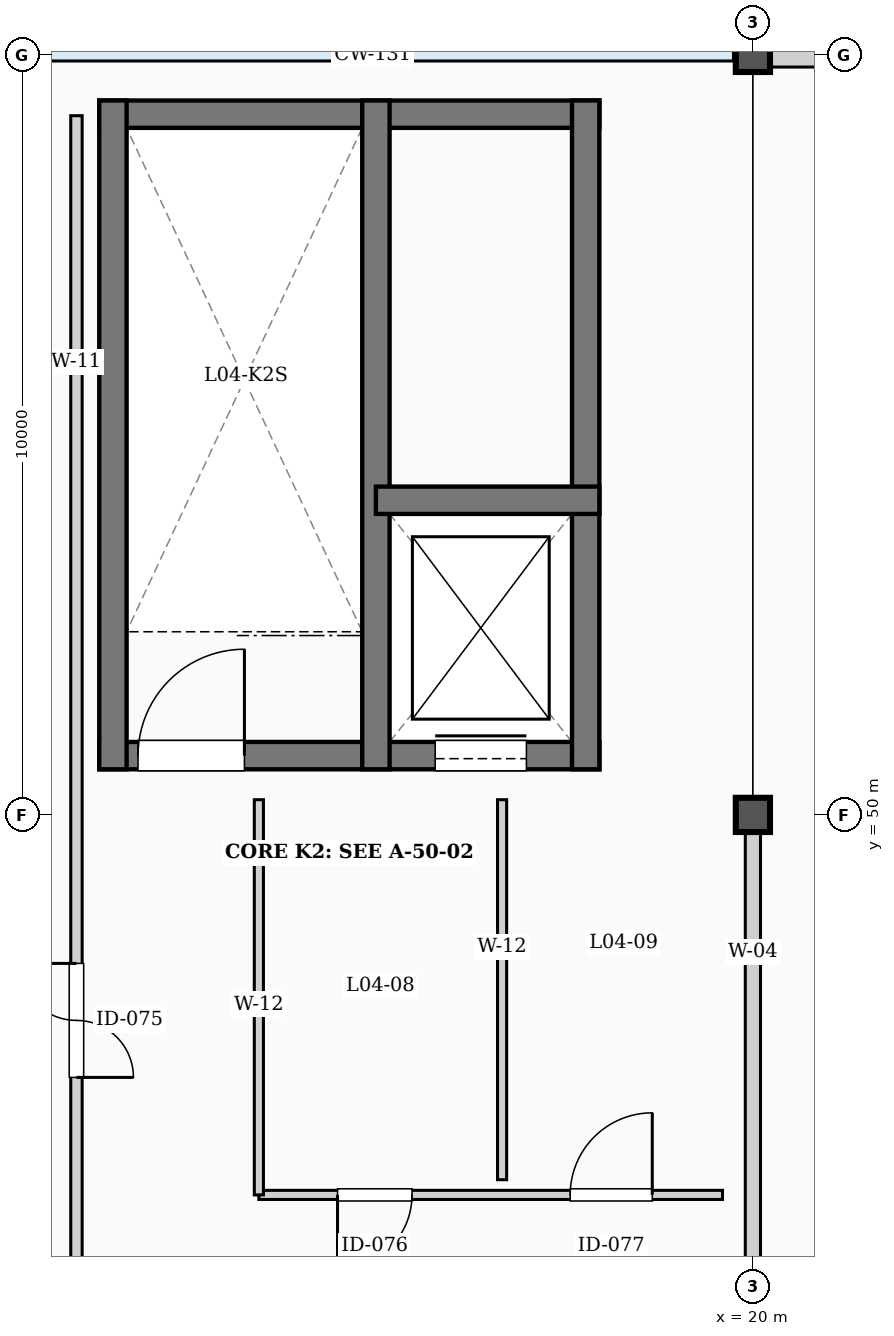
"""IFC4 building model, lengths in metres.
Left out: names, types, materials, properties, quantities, classifications, styles, units other than length and angle.
Written with IfcOpenShell. Run it as: python <this file> out.ifc"""

import sys

from ifc_helpers import new_model, si_unit, direction, frame, frame_2d, origin, origin_2d, place, context, subcontext, project, spatial, rectangle, extrude, element, fill, save


model = new_model("IFC4")
c1 = context("Model", 3, precision=1e-05, world=origin(), true_north=direction((0.0, 1.0)))
c2 = subcontext(c1, "Body", "Model", "MODEL_VIEW")
j1 = project(units=[si_unit("LENGTHUNIT", "METRE"), si_unit("PLANEANGLEUNIT", "RADIAN")], contexts=[c1])
p1 = place(None, origin())
s1 = spatial("IfcSite", under=j1, at=p1, CompositionType="ELEMENT")
p2 = place(p1, origin())
s2 = spatial("IfcBuilding", under=s1, at=p2, CompositionType="ELEMENT")
p3 = place(p2, frame((0.0, 0.0, 18.3)))
s3 = spatial("IfcBuildingStorey", under=s2, at=p3, CompositionType="ELEMENT", Elevation=18.3)
for number, where, z_axis, x_axis in (
    (1, (20.0, 50.0, 0.0), (0.0, 0.0, 1.0), (1.0, 0.0, 0.0)),
    (2, (20.0, 60.0, 0.0), (0.0, 0.0, 1.0), (1.0, 0.0, 0.0)),
):
    element("IfcColumn", number, at=place(p3, frame(where, z_axis=z_axis, x_axis=x_axis)), inside=s3, PredefinedType="COLUMN", context=c2, shape_type="SweptSolid", body=[
        extrude(rectangle(XDim=0.45, YDim=0.45, at=origin_2d()), origin(), (0.0, 0.0, 1.0), 3.9),
    ])
p4 = place(p3, frame((20.225, 60.0, 0.0), z_axis=(0.0, 0.0, 1.0), x_axis=(1.0, 0.0, 0.0)))
e3 = element("IfcWall", 3, at=p4, inside=s3, PredefinedType="SOLIDWALL", context=c2, shape_type="SweptSolid", body=[
    extrude(rectangle(XDim=9.55, YDim=0.32, at=frame_2d((4.775, 0.0))), origin(), (0.0, 0.0, 1.0), 3.58),
])
p5 = place(p4, frame((4.275, 0.0, 0.0)))
e4 = element("IfcOpeningElement", 4, at=p5, cuts=e3, PredefinedType="OPENING", context=c2, shape_type="SweptSolid", body=[
    extrude(rectangle(XDim=1.0, YDim=2.3, at=frame_2d((0.5, 1.15))), frame((0.0, 0.17, 0.0), z_axis=(0.0, -1.0, 0.0), x_axis=(1.0, 0.0, 0.0)), (0.0, 0.0, 1.0), 0.34),
])
p6 = place(p3, frame((11.4, 50.78, 0.0), z_axis=(0.0, 0.0, 1.0), x_axis=(1.0, 0.0, 0.0)))
e5 = element("IfcWall", 5, at=p6, inside=s3, PredefinedType="SHEAR", context=c2, shape_type="SweptSolid", body=[
    extrude(rectangle(XDim=6.58, YDim=0.36, at=frame_2d((3.29, 0.0))), origin(), (0.0, 0.0, 1.0), 3.35),
])
p7 = place(p6, frame((0.51, 0.0, 0.0)))
e6 = element("IfcOpeningElement", 6, at=p7, cuts=e5, PredefinedType="OPENING", context=c2, shape_type="SweptSolid", body=[
    extrude(rectangle(XDim=1.4, YDim=2.35, at=frame_2d((0.7, 1.175))), frame((0.0, 0.19, 0.0), z_axis=(0.0, -1.0, 0.0), x_axis=(1.0, 0.0, 0.0)), (0.0, 0.0, 1.0), 0.38),
])
p8 = place(p6, frame((4.42, 0.0, 0.0)))
e7 = element("IfcOpeningElement", 7, at=p8, cuts=e5, PredefinedType="OPENING", context=c2, shape_type="SweptSolid", body=[
    extrude(rectangle(XDim=1.2, YDim=2.35, at=frame_2d((0.6, 1.175))), frame((0.0, 0.19, 0.0), z_axis=(0.0, -1.0, 0.0), x_axis=(1.0, 0.0, 0.0)), (0.0, 0.0, 1.0), 0.38),
])
p9 = place(p3, frame((11.4, 59.22, 0.0), z_axis=(0.0, 0.0, 1.0), x_axis=(1.0, 0.0, 0.0)))
e8 = element("IfcWall", 8, at=p9, inside=s3, PredefinedType="SHEAR", context=c2, shape_type="SweptSolid", body=[
    extrude(rectangle(XDim=6.58, YDim=0.36, at=frame_2d((3.29, 0.0))), origin(), (0.0, 0.0, 1.0), 3.35),
])
for number, where, z_axis, x_axis in (
    (9, (11.58, 50.6, 0.0), (0.0, 0.0, 1.0), (0.0, 1.0, 0.0)),
    (10, (17.8, 50.6, 0.0), (0.0, 0.0, 1.0), (0.0, 1.0, 0.0)),
    (11, (15.04, 50.6, 0.0), (0.0, 0.0, 1.0), (0.0, 1.0, 0.0)),
):
    element("IfcWall", number, at=place(p3, frame(where, z_axis=z_axis, x_axis=x_axis)), inside=s3, PredefinedType="SHEAR", context=c2, shape_type="SweptSolid", body=[
        extrude(rectangle(XDim=8.8, YDim=0.36, at=frame_2d((4.4, 0.0))), origin(), (0.0, 0.0, 1.0), 3.35),
    ])
p10 = place(p3, frame((15.04, 54.14, 0.0), z_axis=(0.0, 0.0, 1.0), x_axis=(1.0, 0.0, 0.0)))
e12 = element("IfcWall", 12, at=p10, inside=s3, PredefinedType="SHEAR", context=c2, shape_type="SweptSolid", body=[
    extrude(rectangle(XDim=2.94, YDim=0.36, at=frame_2d((1.47, 0.0))), origin(), (0.0, 0.0, 1.0), 3.35),
])
p11 = place(p3, frame((20.0, 20.8, 0.0), z_axis=(0.0, 0.0, 1.0), x_axis=(0.0, 1.0, 0.0)))
e13 = element("IfcWall", 13, at=p11, inside=s3, PredefinedType="PARTITIONING", context=c2, shape_type="SweptSolid", body=[
    extrude(rectangle(XDim=29.4, YDim=0.2, at=frame_2d((14.7, 0.0))), origin(), (0.0, 0.0, 1.0), 3.51),
])
p12 = place(p11, frame((10.666, 0.0, 0.0)))
e14 = element("IfcOpeningElement", 14, at=p12, cuts=e13, PredefinedType="OPENING", context=c2, shape_type="SweptSolid", body=[
    extrude(rectangle(XDim=1.6, YDim=2.4, at=frame_2d((0.8, 1.2))), frame((0.0, 0.11, 0.0), z_axis=(0.0, -1.0, 0.0), x_axis=(1.0, 0.0, 0.0)), (0.0, 0.0, 1.0), 0.22),
])
p13 = place(p11, frame((15.939, 0.0, 0.0)))
e15 = element("IfcOpeningElement", 15, at=p13, cuts=e13, PredefinedType="OPENING", context=c2, shape_type="SweptSolid", body=[
    extrude(rectangle(XDim=1.05, YDim=2.45, at=frame_2d((0.525, 1.225))), frame((0.0, 0.11, 0.0), z_axis=(0.0, -1.0, 0.0), x_axis=(1.0, 0.0, 0.0)), (0.0, 0.0, 1.0), 0.22),
])
p14 = place(p3, frame((11.1, 20.8, 0.0), z_axis=(0.0, 0.0, 1.0), x_axis=(0.0, 1.0, 0.0)))
e16 = element("IfcWall", 16, at=p14, inside=s3, PredefinedType="PARTITIONING", context=c2, shape_type="SweptSolid", body=[
    extrude(rectangle(XDim=38.4, YDim=0.15, at=frame_2d((19.2, 0.0))), origin(), (0.0, 0.0, 1.0), 3.56),
])
p15 = place(p14, frame((16.321, 0.0, 0.0)))
e17 = element("IfcOpeningElement", 17, at=p15, cuts=e16, PredefinedType="OPENING", context=c2, shape_type="SweptSolid", body=[
    extrude(rectangle(XDim=1.15, YDim=2.35, at=frame_2d((0.575, 1.175))), frame((0.0, 0.085, 0.0), z_axis=(0.0, -1.0, 0.0), x_axis=(1.0, 0.0, 0.0)), (0.0, 0.0, 1.0), 0.17),
])
p16 = place(p14, frame((25.746, 0.0, 0.0)))
e18 = element("IfcOpeningElement", 18, at=p16, cuts=e16, PredefinedType="OPENING", context=c2, shape_type="SweptSolid", body=[
    extrude(rectangle(XDim=1.5, YDim=2.5, at=frame_2d((0.75, 1.25))), frame((0.0, 0.085, 0.0), z_axis=(0.0, -1.0, 0.0), x_axis=(1.0, 0.0, 0.0)), (0.0, 0.0, 1.0), 0.17),
])
p17 = place(p3, frame((13.5, 45.0, 0.0), z_axis=(0.0, 0.0, 1.0), x_axis=(1.0, 0.0, 0.0)))
e19 = element("IfcWall", 19, at=p17, inside=s3, PredefinedType="PARTITIONING", context=c2, shape_type="SweptSolid", body=[
    extrude(rectangle(XDim=6.1, YDim=0.12, at=frame_2d((3.05, 0.0))), origin(), (0.0, 0.0, 1.0), 3.56),
])
p18 = place(p17, frame((1.035, 0.0, 0.0)))
e20 = element("IfcOpeningElement", 20, at=p18, cuts=e19, PredefinedType="OPENING", context=c2, shape_type="SweptSolid", body=[
    extrude(rectangle(XDim=0.98, YDim=2.3, at=frame_2d((0.49, 1.15))), frame((0.0, 0.07, 0.0), z_axis=(0.0, -1.0, 0.0), x_axis=(1.0, 0.0, 0.0)), (0.0, 0.0, 1.0), 0.14),
])
p19 = place(p17, frame((4.096, 0.0, 0.0)))
e21 = element("IfcOpeningElement", 21, at=p19, cuts=e19, PredefinedType="OPENING", context=c2, shape_type="SweptSolid", body=[
    extrude(rectangle(XDim=1.08, YDim=2.35, at=frame_2d((0.54, 1.175))), frame((0.0, 0.07, 0.0), z_axis=(0.0, -1.0, 0.0), x_axis=(1.0, 0.0, 0.0)), (0.0, 0.0, 1.0), 0.14),
])
p20 = place(p3, frame((13.5, 45.0, 0.0), z_axis=(0.0, 0.0, 1.0), x_axis=(0.0, 1.0, 0.0)))
e22 = element("IfcWall", 22, at=p20, inside=s3, PredefinedType="PARTITIONING", context=c2, shape_type="SweptSolid", body=[
    extrude(rectangle(XDim=5.2, YDim=0.12, at=frame_2d((2.6, 0.0))), origin(), (0.0, 0.0, 1.0), 3.56),
])
p21 = place(p3, frame((16.7, 45.2, 0.0), z_axis=(0.0, 0.0, 1.0), x_axis=(0.0, 1.0, 0.0)))
e23 = element("IfcWall", 23, at=p21, inside=s3, PredefinedType="PARTITIONING", context=c2, shape_type="SweptSolid", body=[
    extrude(rectangle(XDim=5.0, YDim=0.12, at=frame_2d((2.5, 0.0))), origin(), (0.0, 0.0, 1.0), 3.56),
])
p22 = place(p7, origin())
e24 = element("IfcDoor", 24, at=p22, inside=s3, OperationType="SINGLE_SWING_RIGHT", PredefinedType="DOOR", context=c2, shape_type="SweptSolid", body=[
    extrude(rectangle(XDim=1.4, YDim=2.35, at=frame_2d((0.7, 1.175))), frame((0.0, 0.025, 0.0), z_axis=(0.0, -1.0, 0.0), x_axis=(1.0, 0.0, 0.0)), (0.0, 0.0, 1.0), 0.05),
])
fill(e6, e24)
p23 = place(p8, origin())
e25 = element("IfcDoor", 25, at=p23, inside=s3, OperationType="SLIDING_TO_LEFT", PredefinedType="DOOR", context=c2, shape_type="SweptSolid", body=[
    extrude(rectangle(XDim=1.2, YDim=2.35, at=frame_2d((0.6, 1.175))), frame((0.0, 0.025, 0.0), z_axis=(0.0, -1.0, 0.0), x_axis=(1.0, 0.0, 0.0)), (0.0, 0.0, 1.0), 0.05),
])
fill(e7, e25)
p24 = place(p16, origin())
e26 = element("IfcDoor", 26, at=p24, inside=s3, OperationType="DOUBLE_DOOR_SINGLE_SWING", PredefinedType="DOOR", context=c2, shape_type="SweptSolid", body=[
    extrude(rectangle(XDim=1.5, YDim=2.5, at=frame_2d((0.75, 1.25))), frame((0.0, 0.025, 0.0), z_axis=(0.0, -1.0, 0.0), x_axis=(1.0, 0.0, 0.0)), (0.0, 0.0, 1.0), 0.05),
])
fill(e18, e26)
p25 = place(p18, origin())
e27 = element("IfcDoor", 27, at=p25, inside=s3, OperationType="SINGLE_SWING_LEFT", PredefinedType="DOOR", context=c2, shape_type="SweptSolid", body=[
    extrude(rectangle(XDim=0.98, YDim=2.3, at=frame_2d((0.49, 1.15))), frame((0.0, 0.025, 0.0), z_axis=(0.0, -1.0, 0.0), x_axis=(1.0, 0.0, 0.0)), (0.0, 0.0, 1.0), 0.05),
])
fill(e20, e27)
p26 = place(p19, origin())
e28 = element("IfcDoor", 28, at=p26, inside=s3, OperationType="SINGLE_SWING_RIGHT", PredefinedType="DOOR", context=c2, shape_type="SweptSolid", body=[
    extrude(rectangle(XDim=1.08, YDim=2.35, at=frame_2d((0.54, 1.175))), frame((0.0, 0.025, 0.0), z_axis=(0.0, -1.0, 0.0), x_axis=(1.0, 0.0, 0.0)), (0.0, 0.0, 1.0), 0.05),
])
fill(e21, e28)
save(model, sys.argv[1])
